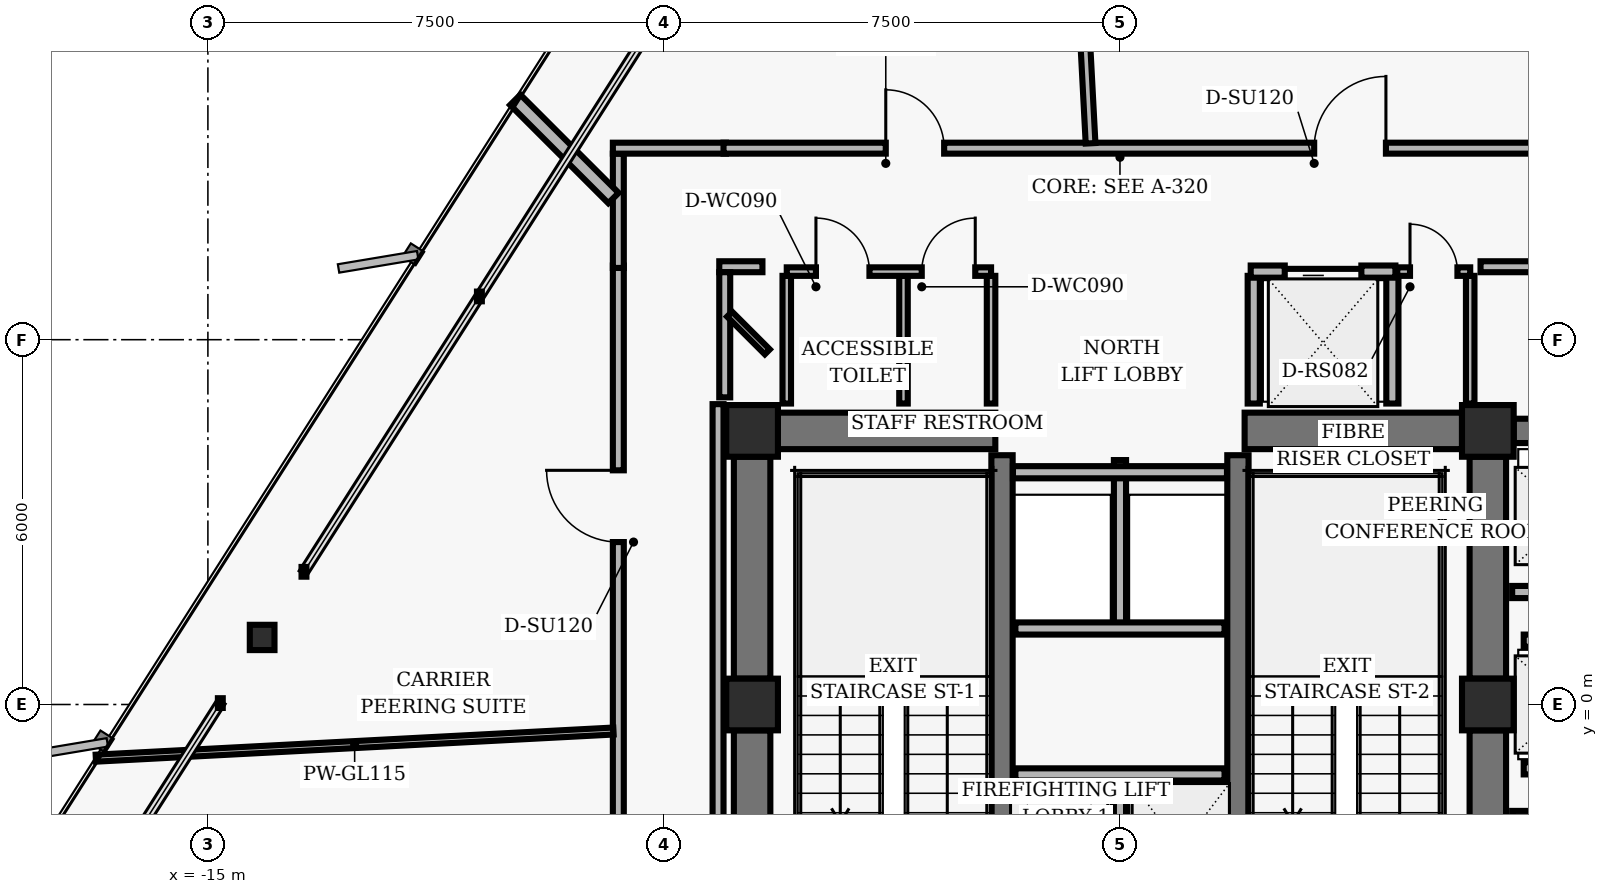
"""IFC4 building model, lengths in metres.
Left out: names, types, materials, properties, quantities, classifications, styles, units other than length and angle.
Written with IfcOpenShell. Run it as: python <this file> out.ifc"""

import sys

from ifc_helpers import new_model, si_unit, direction, frame, frame_2d, origin, origin_2d, place, context, subcontext, project, spatial, rectangle, hollow_rectangle, i_section, extrude, element, fill, save


model = new_model("IFC4")
c1 = context("Model", 3, precision=1e-05, world=origin(), true_north=direction((0.0, 1.0)))
c2 = subcontext(c1, "Body", "Model", "MODEL_VIEW")
j1 = project(units=[si_unit("LENGTHUNIT", "METRE"), si_unit("PLANEANGLEUNIT", "RADIAN")], contexts=[c1])
p1 = place(None, origin())
s1 = spatial("IfcSite", under=j1, at=p1, CompositionType="ELEMENT")
p2 = place(p1, origin())
s2 = spatial("IfcBuilding", under=s1, at=p2, CompositionType="ELEMENT")
p3 = place(p2, frame((0.0, 0.0, 132.0)))
s3 = spatial("IfcBuildingStorey", under=s2, at=p3, CompositionType="ELEMENT", Elevation=132.0)
for number, where, z_axis, x_axis in (
    (1, (-6.05, 4.5, 0.0), (0.0, 0.0, 1.0), (1.0, 0.0, 0.0)),
    (2, (6.05, 4.5, 0.0), (0.0, 0.0, 1.0), (1.0, 0.0, 0.0)),
    (3, (-6.05, 0.0, 0.0), (0.0, 0.0, 1.0), (1.0, 0.0, 0.0)),
    (4, (6.05, 0.0, 0.0), (0.0, 0.0, 1.0), (1.0, 0.0, 0.0)),
):
    element("IfcColumn", number, at=place(p3, frame(where, z_axis=z_axis, x_axis=x_axis)), inside=s3, PredefinedType="COLUMN", context=c2, shape_type="SweptSolid", body=[
        extrude(hollow_rectangle(XDim=0.85, YDim=0.85, WallThickness=0.055, InnerFilletRadius=0.02, OuterFilletRadius=0.04, at=origin_2d()), origin(), (0.0, 0.0, 1.0), 3.04),
    ])
p4 = place(p3, frame((-6.05, 0.425, 0.0), z_axis=(0.0, 0.0, 1.0), x_axis=(0.0, 1.0, 0.0)))
e5 = element("IfcWall", 5, at=p4, inside=s3, PredefinedType="SHEAR", context=c2, shape_type="SweptSolid", body=[
    extrude(rectangle(XDim=3.65, YDim=0.6, at=frame_2d((1.825, 0.0))), origin(), (0.0, 0.0, 1.0), 2.788),
])
p5 = place(p3, frame((-6.05, -3.875, 0.0), z_axis=(0.0, 0.0, 1.0), x_axis=(0.0, 1.0, 0.0)))
e6 = element("IfcWall", 6, at=p5, inside=s3, PredefinedType="SHEAR", context=c2, shape_type="SweptSolid", body=[
    extrude(rectangle(XDim=3.45, YDim=0.6, at=frame_2d((1.725, 0.0))), origin(), (0.0, 0.0, 1.0), 2.788),
])
p6 = place(p3, frame((6.05, 0.425, 0.0), z_axis=(0.0, 0.0, 1.0), x_axis=(0.0, 1.0, 0.0)))
e7 = element("IfcWall", 7, at=p6, inside=s3, PredefinedType="SHEAR", context=c2, shape_type="SweptSolid", body=[
    extrude(rectangle(XDim=3.65, YDim=0.6, at=frame_2d((1.825, 0.0))), origin(), (0.0, 0.0, 1.0), 2.788),
])
p7 = place(p3, frame((6.05, -3.875, 0.0), z_axis=(0.0, 0.0, 1.0), x_axis=(0.0, 1.0, 0.0)))
e8 = element("IfcWall", 8, at=p7, inside=s3, PredefinedType="SHEAR", context=c2, shape_type="SweptSolid", body=[
    extrude(rectangle(XDim=3.45, YDim=0.6, at=frame_2d((1.725, 0.0))), origin(), (0.0, 0.0, 1.0), 2.788),
])
for number, where, z_axis, x_axis in (
    (9, (-1.94, -4.1, 0.0), (0.0, 0.0, 1.0), (0.0, 1.0, 0.0)),
    (10, (1.94, -4.1, 0.0), (0.0, 0.0, 1.0), (0.0, 1.0, 0.0)),
):
    element("IfcWall", number, at=place(p3, frame(where, z_axis=z_axis, x_axis=x_axis)), inside=s3, PredefinedType="SHEAR", context=c2, shape_type="SweptSolid", body=[
        extrude(rectangle(XDim=8.2, YDim=0.35, at=frame_2d((4.1, 0.0))), origin(), (0.0, 0.0, 1.0), 2.788),
    ])
for number, where, z_axis, x_axis in (
    (11, (-5.625, 4.5, 0.0), (0.0, 0.0, 1.0), (1.0, 0.0, 0.0)),
    (12, (2.05, 4.5, 0.0), (0.0, 0.0, 1.0), (1.0, 0.0, 0.0)),
):
    element("IfcWall", number, at=place(p3, frame(where, z_axis=z_axis, x_axis=x_axis)), inside=s3, PredefinedType="SHEAR", context=c2, shape_type="SweptSolid", body=[
        extrude(rectangle(XDim=3.575, YDim=0.6, at=frame_2d((1.788, 0.0))), origin(), (0.0, 0.0, 1.0), 2.788),
    ])
p8 = place(p3, frame((6.475, 4.5, 0.0), z_axis=(0.0, 0.0, 1.0), x_axis=(1.0, 0.0, 0.0)))
e13 = element("IfcWall", 13, at=p8, inside=s3, PredefinedType="SHEAR", context=c2, shape_type="SweptSolid", body=[
    extrude(rectangle(XDim=2.05, YDim=0.4, at=frame_2d((1.025, 0.0))), origin(), (0.0, 0.0, 1.0), 2.788),
])
p9 = place(p3, frame((-14.108, 1.103, 0.0), z_axis=(0.0, 0.0, 1.0), x_axis=(1.0, 0.0, 0.0)))
e14 = element("IfcColumn", 14, at=p9, inside=s3, PredefinedType="COLUMN", context=c2, shape_type="SweptSolid", body=[
    extrude(i_section(OverallWidth=0.406, OverallDepth=0.416, WebThickness=0.03, FlangeThickness=0.048, FilletRadius=0.02, at=origin_2d()), origin(), (0.0, 0.0, 1.0), 3.04),
])
p10 = place(p3, frame((0.0, -3.82, 0.0), z_axis=(0.0, 0.0, 1.0), x_axis=(0.0, 1.0, 0.0)))
e15 = element("IfcWall", 15, at=p10, inside=s3, PredefinedType="PARTITIONING", context=c2, shape_type="SweptSolid", body=[
    extrude(rectangle(XDim=2.67, YDim=0.2, at=frame_2d((1.335, 0.0))), origin(), (0.0, 0.0, 1.0), 2.763),
])
p11 = place(p3, frame((-1.72, -1.15, 0.0), z_axis=(0.0, 0.0, 1.0), x_axis=(1.0, 0.0, 0.0)))
e16 = element("IfcWall", 16, at=p11, inside=s3, PredefinedType="PARTITIONING", context=c2, shape_type="SweptSolid", body=[
    extrude(rectangle(XDim=3.44, YDim=0.2, at=frame_2d((1.72, 0.0))), origin(), (0.0, 0.0, 1.0), 2.763),
])
p12 = place(p3, frame((0.0, 1.25, 0.0), z_axis=(0.0, 0.0, 1.0), x_axis=(0.0, 1.0, 0.0)))
e17 = element("IfcWall", 17, at=p12, inside=s3, PredefinedType="PARTITIONING", context=c2, shape_type="SweptSolid", body=[
    extrude(rectangle(XDim=2.77, YDim=0.2, at=frame_2d((1.385, 0.0))), origin(), (0.0, 0.0, 1.0), 2.763),
])
p13 = place(p3, frame((-1.72, 1.25, 0.0), z_axis=(0.0, 0.0, 1.0), x_axis=(1.0, 0.0, 0.0)))
e18 = element("IfcWall", 18, at=p13, inside=s3, PredefinedType="PARTITIONING", context=c2, shape_type="SweptSolid", body=[
    extrude(rectangle(XDim=3.44, YDim=0.2, at=frame_2d((1.72, 0.0))), origin(), (0.0, 0.0, 1.0), 2.763),
])
p14 = place(p3, frame((-1.76, 3.82, 0.0), z_axis=(0.0, 0.0, 1.0), x_axis=(1.0, 0.0, 0.0)))
e19 = element("IfcWall", 19, at=p14, inside=s3, PredefinedType="PARTITIONING", context=c2, shape_type="SweptSolid", body=[
    extrude(rectangle(XDim=3.52, YDim=0.2, at=frame_2d((1.76, 0.0))), origin(), (0.0, 0.0, 1.0), 2.763),
])
for number, where, z_axis, x_axis in (
    (20, (2.2, 4.95, 0.0), (0.0, 0.0, 1.0), (0.0, 1.0, 0.0)),
    (21, (4.48, 4.95, 0.0), (0.0, 0.0, 1.0), (0.0, 1.0, 0.0)),
):
    element("IfcWall", number, at=place(p3, frame(where, z_axis=z_axis, x_axis=x_axis)), inside=s3, PredefinedType="PARTITIONING", context=c2, shape_type="SweptSolid", body=[
        extrude(rectangle(XDim=2.1, YDim=0.2, at=frame_2d((1.05, 0.0))), origin(), (0.0, 0.0, 1.0), 2.763),
    ])
p15 = place(p3, frame((2.15, 7.12, 0.0), z_axis=(0.0, 0.0, 1.0), x_axis=(1.0, 0.0, 0.0)))
e22 = element("IfcWall", 22, at=p15, inside=s3, PredefinedType="PARTITIONING", context=c2, shape_type="SweptSolid", body=[
    extrude(rectangle(XDim=2.38, YDim=0.2, at=frame_2d((1.19, 0.0))), origin(), (0.0, 0.0, 1.0), 2.763),
])
p16 = place(p15, frame((0.56, 0.0, 0.0)))
e23 = element("IfcOpeningElement", 23, at=p16, cuts=e22, PredefinedType="OPENING", context=c2, shape_type="SweptSolid", body=[
    extrude(rectangle(XDim=1.26, YDim=2.06, at=frame_2d((0.63, 1.03))), frame((0.0, 0.11, 0.0), z_axis=(0.0, -1.0, 0.0), x_axis=(1.0, 0.0, 0.0)), (0.0, 0.0, 1.0), 0.22),
])
for number, where, z_axis, x_axis in (
    (24, (-5.48, 4.95, 0.0), (0.0, 0.0, 1.0), (0.0, 1.0, 0.0)),
    (25, (-3.56, 4.95, 0.0), (0.0, 0.0, 1.0), (0.0, 1.0, 0.0)),
    (26, (-2.12, 4.95, 0.0), (0.0, 0.0, 1.0), (0.0, 1.0, 0.0)),
):
    element("IfcWall", number, at=place(p3, frame(where, z_axis=z_axis, x_axis=x_axis)), inside=s3, PredefinedType="PARTITIONING", context=c2, shape_type="SweptSolid", body=[
        extrude(rectangle(XDim=2.1, YDim=0.14, at=frame_2d((1.05, 0.0))), origin(), (0.0, 0.0, 1.0), 2.763),
    ])
p17 = place(p3, frame((-5.48, 7.12, 0.0), z_axis=(0.0, 0.0, 1.0), x_axis=(1.0, 0.0, 0.0)))
e27 = element("IfcWall", 27, at=p17, inside=s3, PredefinedType="PARTITIONING", context=c2, shape_type="SweptSolid", body=[
    extrude(rectangle(XDim=3.36, YDim=0.14, at=frame_2d((1.68, 0.0))), origin(), (0.0, 0.0, 1.0), 2.33),
])
p18 = place(p17, frame((0.48, 0.0, 0.0)))
e28 = element("IfcOpeningElement", 28, at=p18, cuts=e27, PredefinedType="OPENING", context=c2, shape_type="SweptSolid", body=[
    extrude(rectangle(XDim=0.88, YDim=2.02, at=frame_2d((0.44, 1.01))), frame((0.0, 0.08, 0.0), z_axis=(0.0, -1.0, 0.0), x_axis=(1.0, 0.0, 0.0)), (0.0, 0.0, 1.0), 0.16),
])
p19 = place(p17, frame((2.22, 0.0, 0.0)))
e29 = element("IfcOpeningElement", 29, at=p19, cuts=e27, PredefinedType="OPENING", context=c2, shape_type="SweptSolid", body=[
    extrude(rectangle(XDim=0.88, YDim=2.02, at=frame_2d((0.44, 1.01))), frame((0.0, 0.08, 0.0), z_axis=(0.0, -1.0, 0.0), x_axis=(1.0, 0.0, 0.0)), (0.0, 0.0, 1.0), 0.16),
])
p20 = place(p3, frame((5.76, 4.95, 0.0), z_axis=(0.0, 0.0, 1.0), x_axis=(0.0, 1.0, 0.0)))
e30 = element("IfcWall", 30, at=p20, inside=s3, PredefinedType="PARTITIONING", context=c2, shape_type="SweptSolid", body=[
    extrude(rectangle(XDim=2.1, YDim=0.14, at=frame_2d((1.05, 0.0))), origin(), (0.0, 0.0, 1.0), 2.763),
])
p21 = place(p3, frame((4.56, 7.12, 0.0), z_axis=(0.0, 0.0, 1.0), x_axis=(1.0, 0.0, 0.0)))
e31 = element("IfcWall", 31, at=p21, inside=s3, PredefinedType="PARTITIONING", context=c2, shape_type="SweptSolid", body=[
    extrude(rectangle(XDim=1.2, YDim=0.14, at=frame_2d((0.6, 0.0))), origin(), (0.0, 0.0, 1.0), 2.763),
])
p22 = place(p21, frame((0.21, 0.0, 0.0)))
e32 = element("IfcOpeningElement", 32, at=p22, cuts=e31, PredefinedType="OPENING", context=c2, shape_type="SweptSolid", body=[
    extrude(rectangle(XDim=0.78, YDim=2.01, at=frame_2d((0.39, 1.005))), frame((0.0, 0.08, 0.0), z_axis=(0.0, -1.0, 0.0), x_axis=(1.0, 0.0, 0.0)), (0.0, 0.0, 1.0), 0.16),
])
for number, where, z_axis, x_axis in (
    (33, (6.45, -1.85, 0.0), (0.0, 0.0, 1.0), (1.0, 0.0, 0.0)),
    (34, (6.45, 1.85, 0.0), (0.0, 0.0, 1.0), (1.0, 0.0, 0.0)),
):
    element("IfcWall", number, at=place(p3, frame(where, z_axis=z_axis, x_axis=x_axis)), inside=s3, PredefinedType="PARTITIONING", context=c2, shape_type="SweptSolid", body=[
        extrude(rectangle(XDim=2.1, YDim=0.2, at=frame_2d((1.05, 0.0))), origin(), (0.0, 0.0, 1.0), 2.763),
    ])
for number, where, z_axis, x_axis in (
    (35, (6.64, -1.05, 0.0), (0.0, 0.0, 1.0), (1.0, 0.0, 0.0)),
    (36, (6.64, 1.05, 0.0), (0.0, 0.0, 1.0), (1.0, 0.0, 0.0)),
):
    element("IfcWall", number, at=place(p3, frame(where, z_axis=z_axis, x_axis=x_axis)), inside=s3, PredefinedType="PARTITIONING", context=c2, shape_type="SweptSolid", body=[
        extrude(rectangle(XDim=1.91, YDim=0.2, at=frame_2d((0.955, 0.0))), origin(), (0.0, 0.0, 1.0), 2.763),
    ])
p23 = place(p3, frame((-8.25, -7.22, 0.0), z_axis=(0.0, 0.0, 1.0), x_axis=(0.0, 1.0, 0.0)))
e37 = element("IfcWall", 37, at=p23, inside=s3, PredefinedType="PARTITIONING", context=c2, shape_type="SweptSolid", body=[
    extrude(rectangle(XDim=14.44, YDim=0.18, at=frame_2d((7.22, 0.0))), origin(), (0.0, 0.0, 1.0), 2.763),
])
p24 = place(p23, frame((2.932, 0.0, 0.0)))
e38 = element("IfcOpeningElement", 38, at=p24, cuts=e37, PredefinedType="OPENING", context=c2, shape_type="SweptSolid", body=[
    extrude(rectangle(XDim=1.18, YDim=2.02, at=frame_2d((0.59, 1.01))), frame((0.0, 0.1, 0.0), z_axis=(0.0, -1.0, 0.0), x_axis=(1.0, 0.0, 0.0)), (0.0, 0.0, 1.0), 0.2),
])
p25 = place(p23, frame((9.892, 0.0, 0.0)))
e39 = element("IfcOpeningElement", 39, at=p25, cuts=e37, PredefinedType="OPENING", context=c2, shape_type="SweptSolid", body=[
    extrude(rectangle(XDim=1.18, YDim=2.02, at=frame_2d((0.59, 1.01))), frame((0.0, 0.1, 0.0), z_axis=(0.0, -1.0, 0.0), x_axis=(1.0, 0.0, 0.0)), (0.0, 0.0, 1.0), 0.2),
])
p26 = place(p3, frame((-8.25, 7.18, 0.0), z_axis=(0.0, 0.0, 1.0), x_axis=(0.0, 1.0, 0.0)))
e40 = element("IfcWall", 40, at=p26, inside=s3, PredefinedType="PARTITIONING", context=c2, shape_type="SweptSolid", body=[
    extrude(rectangle(XDim=1.88, YDim=0.18, at=frame_2d((0.94, 0.0))), origin(), (0.0, 0.0, 1.0), 2.763),
])
p27 = place(p3, frame((-8.34, 9.15, 0.0), z_axis=(0.0, 0.0, 1.0), x_axis=(1.0, 0.0, 0.0)))
e41 = element("IfcWall", 41, at=p27, inside=s3, PredefinedType="PARTITIONING", context=c2, shape_type="SweptSolid", body=[
    extrude(rectangle(XDim=1.86, YDim=0.18, at=frame_2d((0.93, 0.0))), origin(), (0.0, 0.0, 1.0), 2.763),
])
p28 = place(p3, frame((-6.52, 9.15, 0.0), z_axis=(0.0, 0.0, 1.0), x_axis=(1.0, 0.0, 0.0)))
e42 = element("IfcWall", 42, at=p28, inside=s3, PredefinedType="PARTITIONING", context=c2, shape_type="SweptSolid", body=[
    extrude(rectangle(XDim=16.572, YDim=0.18, at=frame_2d((8.286, 0.0))), origin(), (0.0, 0.0, 1.0), 2.33),
])
p29 = place(p28, frame((9.714, 0.0, 0.0)))
e43 = element("IfcOpeningElement", 43, at=p29, cuts=e42, PredefinedType="OPENING", context=c2, shape_type="SweptSolid", body=[
    extrude(rectangle(XDim=1.18, YDim=2.02, at=frame_2d((0.59, 1.01))), frame((0.0, 0.1, 0.0), z_axis=(0.0, -1.0, 0.0), x_axis=(1.0, 0.0, 0.0)), (0.0, 0.0, 1.0), 0.2),
])
p30 = place(p28, frame((2.668, 0.0, 0.0)))
e44 = element("IfcOpeningElement", 44, at=p30, cuts=e42, PredefinedType="OPENING", context=c2, shape_type="SweptSolid", body=[
    extrude(rectangle(XDim=0.96, YDim=2.02, at=frame_2d((0.48, 1.01))), frame((0.0, 0.1, 0.0), z_axis=(0.0, -1.0, 0.0), x_axis=(1.0, 0.0, 0.0)), (0.0, 0.0, 1.0), 0.2),
])
p31 = place(p3, frame((11.05, 7.2, 0.0), z_axis=(0.0, 0.0, 1.0), x_axis=(-1.0, 0.0, 0.0)))
e45 = element("IfcWall", 45, at=p31, inside=s3, PredefinedType="PARTITIONING", context=c2, shape_type="SweptSolid", body=[
    extrude(rectangle(XDim=5.12, YDim=0.18, at=frame_2d((2.56, 0.0))), origin(), (0.0, 0.0, 1.0), 2.763),
])
p32 = place(p31, frame((2.08, 0.0, 0.0)))
e46 = element("IfcOpeningElement", 46, at=p32, cuts=e45, PredefinedType="OPENING", context=c2, shape_type="SweptSolid", body=[
    extrude(rectangle(XDim=0.96, YDim=2.02, at=frame_2d((0.48, 1.01))), frame((0.0, 0.1, 0.0), z_axis=(0.0, -1.0, 0.0), x_axis=(1.0, 0.0, 0.0)), (0.0, 0.0, 1.0), 0.2),
])
p33 = place(p3, frame((-5.88, 7.2, 0.0), z_axis=(0.0, 0.0, 1.0), x_axis=(-1.0, 0.0, 0.0)))
e47 = element("IfcWall", 47, at=p33, inside=s3, PredefinedType="PARTITIONING", context=c2, shape_type="SweptSolid", body=[
    extrude(rectangle(XDim=0.71, YDim=0.18, at=frame_2d((0.355, 0.0))), origin(), (0.0, 0.0, 1.0), 2.33),
])
p34 = place(p3, frame((-6.5, 7.11, 0.0), z_axis=(0.0, 0.0, 1.0), x_axis=(0.0, -1.0, 0.0)))
e48 = element("IfcWall", 48, at=p34, inside=s3, PredefinedType="PARTITIONING", context=c2, shape_type="SweptSolid", body=[
    extrude(rectangle(XDim=2.058, YDim=0.18, at=frame_2d((1.029, 0.0))), origin(), (0.0, 0.0, 1.0), 2.132),
])
p35 = place(p3, frame((-6.61, 4.94, 0.0), z_axis=(0.0, 0.0, 1.0), x_axis=(0.0, -1.0, 0.0)))
e49 = element("IfcWall", 49, at=p35, inside=s3, PredefinedType="PARTITIONING", context=c2, shape_type="SweptSolid", body=[
    extrude(rectangle(XDim=9.46, YDim=0.18, at=frame_2d((4.73, 0.0))), origin(), (0.0, 0.0, 1.0), 2.763),
])
p36 = place(p3, frame((-8.33, -0.437, 0.0), z_axis=(0.0, 0.0, 1.0), x_axis=(-0.998628646782, -0.052352897024, 0.0)))
e50 = element("IfcWall", 50, at=p36, inside=s3, PredefinedType="MOVABLE", context=c2, shape_type="SweptSolid", body=[
    extrude(rectangle(XDim=8.525, YDim=0.115, at=frame_2d((4.262, 0.0))), origin(), (0.0, 0.0, 1.0), 2.763),
])
p37 = place(p3, frame((-0.484, 9.23, 0.0), z_axis=(0.0, 0.0, 1.0), x_axis=(-0.052344416919, 0.998629091313, 0.0)))
e51 = element("IfcWall", 51, at=p37, inside=s3, PredefinedType="PARTITIONING", context=c2, shape_type="SweptSolid", body=[
    extrude(rectangle(XDim=14.403, YDim=0.16, at=frame_2d((7.201, 0.0))), origin(), (0.0, 0.0, 1.0), 2.763),
])
p38 = place(p3, frame((-5.8, 5.8, 0.0), z_axis=(0.0, 0.0, 1.0), x_axis=(-0.707106781187, 0.707106781187, 0.0)))
e52 = element("IfcWall", 52, at=p38, inside=s3, PredefinedType="MOVABLE", context=c2, shape_type="SweptSolid", body=[
    extrude(rectangle(XDim=0.877, YDim=0.115, at=frame_2d((0.438, 0.0))), origin(), (0.0, 0.0, 1.0), 2.763),
])
p39 = place(p3, frame((-8.33, 8.33, 0.0), z_axis=(0.0, 0.0, 1.0), x_axis=(-0.707106781187, 0.707106781187, 0.0)))
e53 = element("IfcWall", 53, at=p39, inside=s3, PredefinedType="PARTITIONING", context=c2, shape_type="SweptSolid", body=[
    extrude(rectangle(XDim=2.284, YDim=0.24, at=frame_2d((1.142, 0.0))), origin(), (0.0, 0.0, 1.0), 2.763),
])
p40 = place(p16, origin())
e54 = element("IfcDoor", 54, at=p40, inside=s3, OperationType="SLIDING_TO_LEFT", PredefinedType="DOOR", context=c2, shape_type="SweptSolid", body=[
    extrude(rectangle(XDim=1.26, YDim=2.06, at=frame_2d((0.63, 1.03))), frame((0.0, 0.025, 0.0), z_axis=(0.0, -1.0, 0.0), x_axis=(1.0, 0.0, 0.0)), (0.0, 0.0, 1.0), 0.05),
])
fill(e23, e54)
p41 = place(p18, origin())
e55 = element("IfcDoor", 55, at=p41, inside=s3, OperationType="SINGLE_SWING_LEFT", PredefinedType="DOOR", context=c2, shape_type="SweptSolid", body=[
    extrude(rectangle(XDim=0.88, YDim=2.02, at=frame_2d((0.44, 1.01))), frame((0.0, 0.025, 0.0), z_axis=(0.0, -1.0, 0.0), x_axis=(1.0, 0.0, 0.0)), (0.0, 0.0, 1.0), 0.05),
])
fill(e28, e55)
p42 = place(p19, origin())
e56 = element("IfcDoor", 56, at=p42, inside=s3, OperationType="SINGLE_SWING_RIGHT", PredefinedType="DOOR", context=c2, shape_type="SweptSolid", body=[
    extrude(rectangle(XDim=0.88, YDim=2.02, at=frame_2d((0.44, 1.01))), frame((0.0, 0.025, 0.0), z_axis=(0.0, -1.0, 0.0), x_axis=(1.0, 0.0, 0.0)), (0.0, 0.0, 1.0), 0.05),
])
fill(e29, e56)
p43 = place(p22, origin())
e57 = element("IfcDoor", 57, at=p43, inside=s3, OperationType="SINGLE_SWING_LEFT", PredefinedType="DOOR", context=c2, shape_type="SweptSolid", body=[
    extrude(rectangle(XDim=0.78, YDim=2.01, at=frame_2d((0.39, 1.005))), frame((0.0, 0.025, 0.0), z_axis=(0.0, -1.0, 0.0), x_axis=(1.0, 0.0, 0.0)), (0.0, 0.0, 1.0), 0.05),
])
fill(e32, e57)
p44 = place(p29, origin())
e58 = element("IfcDoor", 58, at=p44, inside=s3, OperationType="SINGLE_SWING_RIGHT", PredefinedType="DOOR", context=c2, shape_type="SweptSolid", body=[
    extrude(rectangle(XDim=1.18, YDim=2.02, at=frame_2d((0.59, 1.01))), frame((0.0, 0.025, 0.0), z_axis=(0.0, -1.0, 0.0), x_axis=(1.0, 0.0, 0.0)), (0.0, 0.0, 1.0), 0.05),
])
fill(e43, e58)
p45 = place(p30, origin())
e59 = element("IfcDoor", 59, at=p45, inside=s3, OperationType="SINGLE_SWING_LEFT", PredefinedType="DOOR", context=c2, shape_type="SweptSolid", body=[
    extrude(rectangle(XDim=0.96, YDim=2.02, at=frame_2d((0.48, 1.01))), frame((0.0, 0.025, 0.0), z_axis=(0.0, -1.0, 0.0), x_axis=(1.0, 0.0, 0.0)), (0.0, 0.0, 1.0), 0.05),
])
fill(e44, e59)
p46 = place(p25, origin())
e60 = element("IfcDoor", 60, at=p46, inside=s3, OperationType="SINGLE_SWING_RIGHT", PredefinedType="DOOR", context=c2, shape_type="SweptSolid", body=[
    extrude(rectangle(XDim=1.18, YDim=2.02, at=frame_2d((0.59, 1.01))), frame((0.0, 0.025, 0.0), z_axis=(0.0, -1.0, 0.0), x_axis=(1.0, 0.0, 0.0)), (0.0, 0.0, 1.0), 0.05),
])
fill(e39, e60)
save(model, sys.argv[1])
